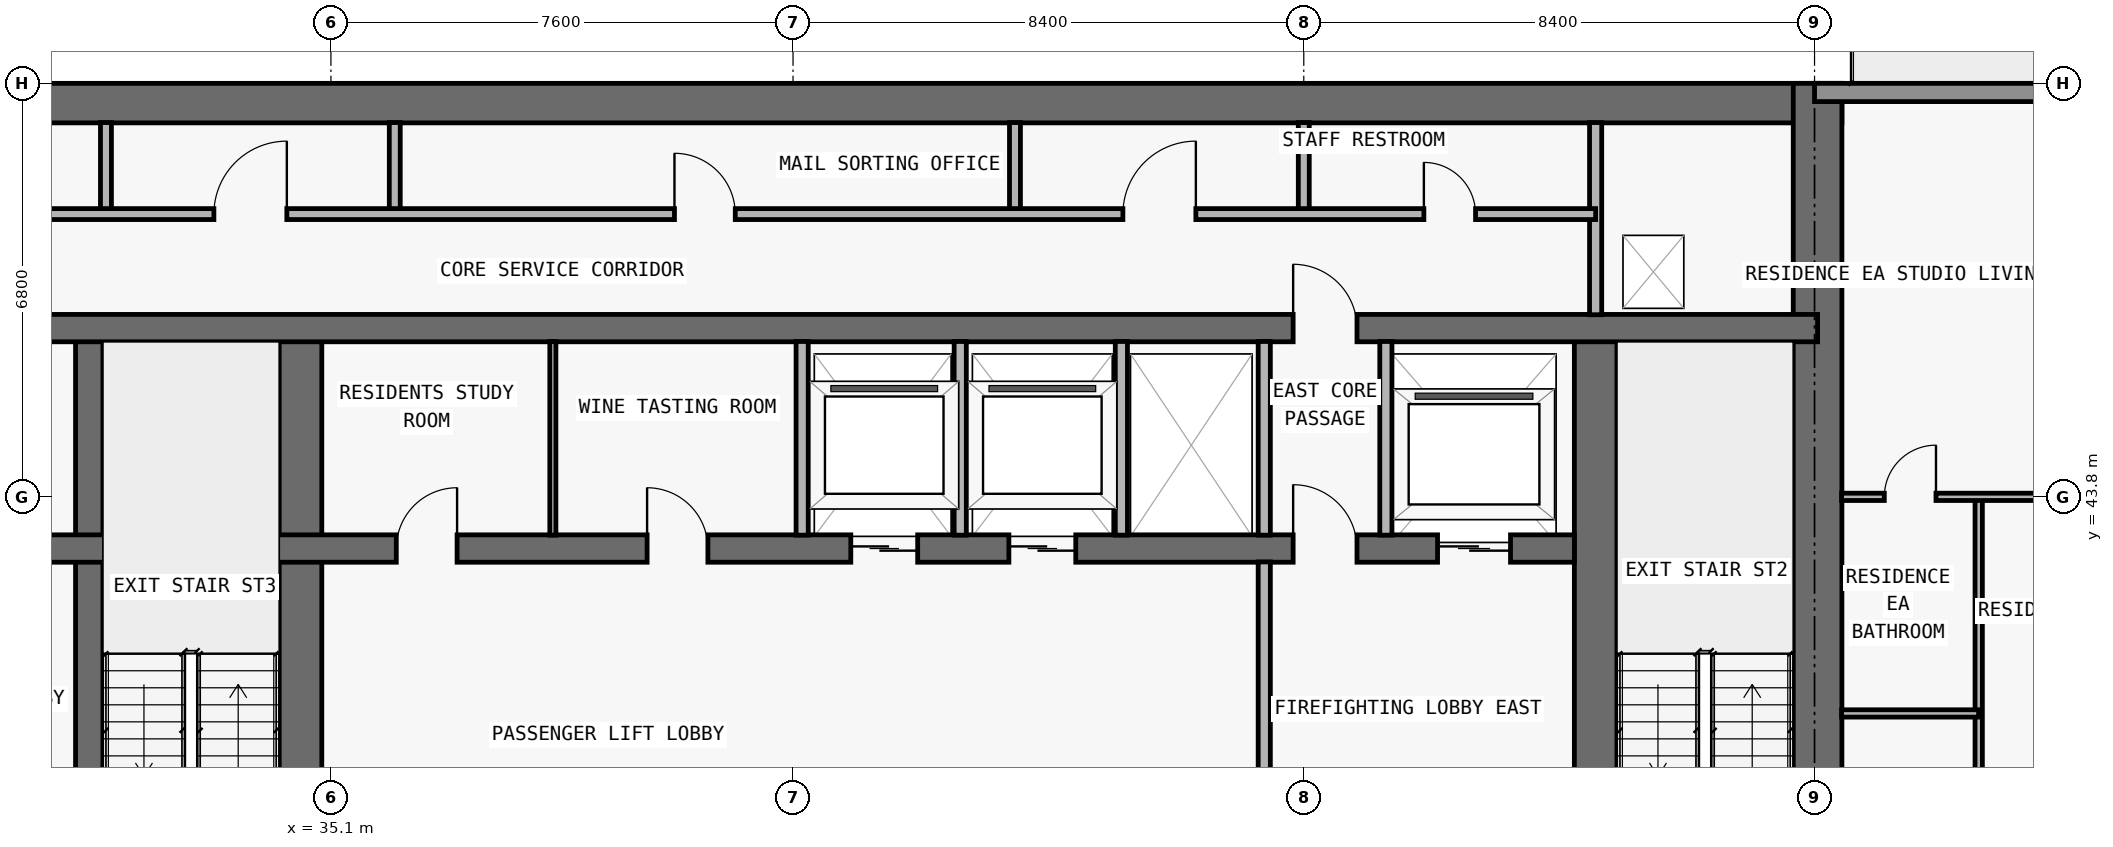
"""IFC4 building model, lengths in metres.
Left out: names, types, materials, properties, quantities, classifications, styles, units other than length and angle.
Written with IfcOpenShell. Run it as: python <this file> out.ifc"""

import sys

from ifc_helpers import new_model, si_unit, direction, frame, frame_2d, origin, place, context, subcontext, project, spatial, rectangle, extrude, element, fill, save


model = new_model("IFC4")
c1 = context("Model", 3, precision=1e-05, world=origin(), true_north=direction((0.0, 1.0)))
c2 = subcontext(c1, "Body", "Model", "MODEL_VIEW")
j1 = project(units=[si_unit("LENGTHUNIT", "METRE"), si_unit("PLANEANGLEUNIT", "RADIAN")], contexts=[c1])
p1 = place(None, origin())
s1 = spatial("IfcSite", under=j1, at=p1, CompositionType="ELEMENT")
p2 = place(p1, origin())
s2 = spatial("IfcBuilding", under=s1, at=p2, CompositionType="ELEMENT")
p3 = place(p2, frame((0.0, 0.0, 109.2)))
s3 = spatial("IfcBuildingStorey", under=s2, at=p3, CompositionType="ELEMENT", Elevation=109.2)
p4 = place(p3, frame((17.85, 50.275, 0.0), z_axis=(0.0, 0.0, 1.0), x_axis=(1.0, 0.0, 0.0)))
e1 = element("IfcWall", 1, at=p4, inside=s3, PredefinedType="SHEAR", context=c2, shape_type="SweptSolid", body=[
    extrude(rectangle(XDim=42.1, YDim=0.65, at=frame_2d((21.05, 0.0))), origin(), (0.0, 0.0, 1.0), 3.05),
])
p5 = place(p3, frame((59.55, 36.55, 0.0), z_axis=(0.0, 0.0, 1.0), x_axis=(0.0, 1.0, 0.0)))
e2 = element("IfcWall", 2, at=p5, inside=s3, PredefinedType="SHEAR", context=c2, shape_type="SweptSolid", body=[
    extrude(rectangle(XDim=14.05, YDim=0.8, at=frame_2d((7.025, 0.0))), origin(), (0.0, 0.0, 1.0), 3.05),
])
p6 = place(p3, frame((55.9, 36.95, 0.0), z_axis=(0.0, 0.0, 1.0), x_axis=(0.0, 1.0, 0.0)))
e3 = element("IfcWall", 3, at=p6, inside=s3, PredefinedType="SHEAR", context=c2, shape_type="SweptSolid", body=[
    extrude(rectangle(XDim=9.625, YDim=0.7, at=frame_2d((4.812, 0.0))), origin(), (0.0, 0.0, 1.0), 3.05),
])
p7 = place(p6, frame((0.6, 0.0, 0.0)))
e4 = element("IfcOpeningElement", 4, at=p7, cuts=e3, PredefinedType="OPENING", context=c2, shape_type="SweptSolid", body=[
    extrude(rectangle(XDim=1.1, YDim=2.15, at=frame_2d((0.55, 1.075))), frame((0.0, 0.36, 0.0), z_axis=(0.0, -1.0, 0.0), x_axis=(1.0, 0.0, 0.0)), (0.0, 0.0, 1.0), 0.72),
])
p8 = place(p3, frame((31.125, 36.95, 0.0), z_axis=(0.0, 0.0, 1.0), x_axis=(0.0, 1.0, 0.0)))
e5 = element("IfcWall", 5, at=p8, inside=s3, PredefinedType="SHEAR", context=c2, shape_type="SweptSolid", body=[
    extrude(rectangle(XDim=9.625, YDim=0.45, at=frame_2d((4.812, 0.0))), origin(), (0.0, 0.0, 1.0), 3.05),
])
p9 = place(p3, frame((34.6, 36.95, 0.0), z_axis=(0.0, 0.0, 1.0), x_axis=(0.0, 1.0, 0.0)))
e6 = element("IfcWall", 6, at=p9, inside=s3, PredefinedType="SHEAR", context=c2, shape_type="SweptSolid", body=[
    extrude(rectangle(XDim=9.625, YDim=0.7, at=frame_2d((4.812, 0.0))), origin(), (0.0, 0.0, 1.0), 3.05),
])
p10 = place(p3, frame((22.25, 42.95, 0.0), z_axis=(0.0, 0.0, 1.0), x_axis=(1.0, 0.0, 0.0)))
e7 = element("IfcWall", 7, at=p10, inside=s3, PredefinedType="SHEAR", context=c2, shape_type="SweptSolid", body=[
    extrude(rectangle(XDim=33.3, YDim=0.45, at=frame_2d((16.65, 0.0))), origin(), (0.0, 0.0, 1.0), 3.05),
])
p11 = place(p10, frame((1.05, 0.0, 0.0)))
e8 = element("IfcOpeningElement", 8, at=p11, cuts=e7, PredefinedType="OPENING", context=c2, shape_type="SweptSolid", body=[
    extrude(rectangle(XDim=1.2, YDim=2.2, at=frame_2d((0.6, 1.1))), frame((0.0, 0.235, 0.0), z_axis=(0.0, -1.0, 0.0), x_axis=(1.0, 0.0, 0.0)), (0.0, 0.0, 1.0), 0.47),
])
p12 = place(p10, frame((31.05, 0.0, 0.0)))
e9 = element("IfcOpeningElement", 9, at=p12, cuts=e7, PredefinedType="OPENING", context=c2, shape_type="SweptSolid", body=[
    extrude(rectangle(XDim=1.2, YDim=2.2, at=frame_2d((0.6, 1.1))), frame((0.0, 0.235, 0.0), z_axis=(0.0, -1.0, 0.0), x_axis=(1.0, 0.0, 0.0)), (0.0, 0.0, 1.0), 0.47),
])
p13 = place(p10, frame((21.4, 0.0, 0.0)))
e10 = element("IfcOpeningElement", 10, at=p13, cuts=e7, PredefinedType="OPENING", context=c2, shape_type="SweptSolid", body=[
    extrude(rectangle(XDim=1.1, YDim=2.2, at=frame_2d((0.55, 1.1))), frame((0.0, 0.235, 0.0), z_axis=(0.0, -1.0, 0.0), x_axis=(1.0, 0.0, 0.0)), (0.0, 0.0, 1.0), 0.47),
])
p14 = place(p10, frame((24.0, 0.0, 0.0)))
e11 = element("IfcOpeningElement", 11, at=p14, cuts=e7, PredefinedType="OPENING", context=c2, shape_type="SweptSolid", body=[
    extrude(rectangle(XDim=1.1, YDim=2.2, at=frame_2d((0.55, 1.1))), frame((0.0, 0.235, 0.0), z_axis=(0.0, -1.0, 0.0), x_axis=(1.0, 0.0, 0.0)), (0.0, 0.0, 1.0), 0.47),
])
p15 = place(p10, frame((3.625, 0.0, 0.0)))
e12 = element("IfcOpeningElement", 12, at=p15, cuts=e7, PredefinedType="OPENING", context=c2, shape_type="SweptSolid", body=[
    extrude(rectangle(XDim=1.05, YDim=2.15, at=frame_2d((0.525, 1.075))), frame((0.0, 0.235, 0.0), z_axis=(0.0, -1.0, 0.0), x_axis=(1.0, 0.0, 0.0)), (0.0, 0.0, 1.0), 0.47),
])
p16 = place(p10, frame((28.675, 0.0, 0.0)))
e13 = element("IfcOpeningElement", 13, at=p16, cuts=e7, PredefinedType="OPENING", context=c2, shape_type="SweptSolid", body=[
    extrude(rectangle(XDim=1.05, YDim=2.15, at=frame_2d((0.525, 1.075))), frame((0.0, 0.235, 0.0), z_axis=(0.0, -1.0, 0.0), x_axis=(1.0, 0.0, 0.0)), (0.0, 0.0, 1.0), 0.47),
])
p17 = place(p10, frame((13.925, 0.0, 0.0)))
e14 = element("IfcOpeningElement", 14, at=p17, cuts=e7, PredefinedType="OPENING", context=c2, shape_type="SweptSolid", body=[
    extrude(rectangle(XDim=1.0, YDim=2.2, at=frame_2d((0.5, 1.1))), frame((0.0, 0.235, 0.0), z_axis=(0.0, -1.0, 0.0), x_axis=(1.0, 0.0, 0.0)), (0.0, 0.0, 1.0), 0.47),
])
p18 = place(p10, frame((18.05, 0.0, 0.0)))
e15 = element("IfcOpeningElement", 15, at=p18, cuts=e7, PredefinedType="OPENING", context=c2, shape_type="SweptSolid", body=[
    extrude(rectangle(XDim=1.0, YDim=2.2, at=frame_2d((0.5, 1.1))), frame((0.0, 0.235, 0.0), z_axis=(0.0, -1.0, 0.0), x_axis=(1.0, 0.0, 0.0)), (0.0, 0.0, 1.0), 0.47),
])
p19 = place(p3, frame((18.25, 46.575, 0.0), z_axis=(0.0, 0.0, 1.0), x_axis=(1.0, 0.0, 0.0)))
e16 = element("IfcWall", 16, at=p19, inside=s3, PredefinedType="SHEAR", context=c2, shape_type="SweptSolid", body=[
    extrude(rectangle(XDim=41.3, YDim=0.45, at=frame_2d((20.65, 0.0))), origin(), (0.0, 0.0, 1.0), 3.05),
])
p20 = place(p19, frame((7.625, 0.0, 0.0)))
e17 = element("IfcOpeningElement", 17, at=p20, cuts=e16, PredefinedType="OPENING", context=c2, shape_type="SweptSolid", body=[
    extrude(rectangle(XDim=1.05, YDim=2.15, at=frame_2d((0.525, 1.075))), frame((0.0, 0.235, 0.0), z_axis=(0.0, -1.0, 0.0), x_axis=(1.0, 0.0, 0.0)), (0.0, 0.0, 1.0), 0.47),
])
p21 = place(p19, frame((32.675, 0.0, 0.0)))
e18 = element("IfcOpeningElement", 18, at=p21, cuts=e16, PredefinedType="OPENING", context=c2, shape_type="SweptSolid", body=[
    extrude(rectangle(XDim=1.05, YDim=2.15, at=frame_2d((0.525, 1.075))), frame((0.0, 0.235, 0.0), z_axis=(0.0, -1.0, 0.0), x_axis=(1.0, 0.0, 0.0)), (0.0, 0.0, 1.0), 0.47),
])
p22 = place(p3, frame((59.5, 50.45, 0.0), z_axis=(0.0, 0.0, 1.0), x_axis=(1.0, 0.0, 0.0)))
e19 = element("IfcWall", 19, at=p22, inside=s3, PredefinedType="STANDARD", context=c2, shape_type="SweptSolid", body=[
    extrude(rectangle(XDim=10.6, YDim=0.3, at=frame_2d((5.3, 0.0))), origin(), (0.0, 0.0, 1.0), 3.05),
])
p23 = place(p22, frame((4.3, 0.0, 0.0)))
e20 = element("IfcOpeningElement", 20, at=p23, cuts=e19, PredefinedType="OPENING", context=c2, shape_type="SweptSolid", body=[
    extrude(rectangle(XDim=2.0, YDim=2.3, at=frame_2d((1.0, 1.15))), frame((0.0, 0.16, 0.0), z_axis=(0.0, -1.0, 0.0), x_axis=(1.0, 0.0, 0.0)), (0.0, 0.0, 1.0), 0.32),
])
for number, where, z_axis, x_axis in (
    (21, (31.4, 48.45, 0.0), (0.0, 0.0, 1.0), (0.0, 1.0, 0.0)),
    (22, (36.15, 48.45, 0.0), (0.0, 0.0, 1.0), (0.0, 1.0, 0.0)),
):
    element("IfcWall", number, at=place(p3, frame(where, z_axis=z_axis, x_axis=x_axis)), inside=s3, PredefinedType="PARTITIONING", context=c2, shape_type="SweptSolid", body=[
        extrude(rectangle(XDim=1.505, YDim=0.18, at=frame_2d((0.752, 0.0))), origin(), (0.0, 0.0, 1.0), 3.05),
    ])
p24 = place(p3, frame((38.75, 43.17, 0.0), z_axis=(0.0, 0.0, 1.0), x_axis=(0.0, 1.0, 0.0)))
e23 = element("IfcWall", 23, at=p24, inside=s3, PredefinedType="MOVABLE", context=c2, shape_type="SweptSolid", body=[
    extrude(rectangle(XDim=3.185, YDim=0.1, at=frame_2d((1.593, 0.0))), origin(), (0.0, 0.0, 1.0), 3.05),
])
for number, where, z_axis, x_axis in (
    (24, (42.85, 43.17, 0.0), (0.0, 0.0, 1.0), (0.0, 1.0, 0.0)),
    (25, (45.45, 43.17, 0.0), (0.0, 0.0, 1.0), (0.0, 1.0, 0.0)),
):
    element("IfcWall", number, at=place(p3, frame(where, z_axis=z_axis, x_axis=x_axis)), inside=s3, PredefinedType="PARTITIONING", context=c2, shape_type="SweptSolid", body=[
        extrude(rectangle(XDim=3.185, YDim=0.2, at=frame_2d((1.593, 0.0))), origin(), (0.0, 0.0, 1.0), 3.05),
    ])
p25 = place(p3, frame((46.35, 48.45, 0.0), z_axis=(0.0, 0.0, 1.0), x_axis=(0.0, 1.0, 0.0)))
e26 = element("IfcWall", 26, at=p25, inside=s3, PredefinedType="PARTITIONING", context=c2, shape_type="SweptSolid", body=[
    extrude(rectangle(XDim=1.505, YDim=0.18, at=frame_2d((0.752, 0.0))), origin(), (0.0, 0.0, 1.0), 3.05),
])
p26 = place(p3, frame((48.1, 43.17, 0.0), z_axis=(0.0, 0.0, 1.0), x_axis=(0.0, 1.0, 0.0)))
e27 = element("IfcWall", 27, at=p26, inside=s3, PredefinedType="PARTITIONING", context=c2, shape_type="SweptSolid", body=[
    extrude(rectangle(XDim=3.185, YDim=0.2, at=frame_2d((1.593, 0.0))), origin(), (0.0, 0.0, 1.0), 3.05),
])
p27 = place(p3, frame((50.45, 37.345, 0.0), z_axis=(0.0, 0.0, 1.0), x_axis=(0.0, 1.0, 0.0)))
e28 = element("IfcWall", 28, at=p27, inside=s3, PredefinedType="PARTITIONING", context=c2, shape_type="SweptSolid", body=[
    extrude(rectangle(XDim=5.385, YDim=0.2, at=frame_2d((2.692, 0.0))), origin(), (0.0, 0.0, 1.0), 3.05),
])
p28 = place(p3, frame((50.45, 43.17, 0.0), z_axis=(0.0, 0.0, 1.0), x_axis=(0.0, 1.0, 0.0)))
e29 = element("IfcWall", 29, at=p28, inside=s3, PredefinedType="PARTITIONING", context=c2, shape_type="SweptSolid", body=[
    extrude(rectangle(XDim=3.185, YDim=0.2, at=frame_2d((1.593, 0.0))), origin(), (0.0, 0.0, 1.0), 3.05),
])
p29 = place(p3, frame((51.1, 48.45, 0.0), z_axis=(0.0, 0.0, 1.0), x_axis=(0.0, 1.0, 0.0)))
e30 = element("IfcWall", 30, at=p29, inside=s3, PredefinedType="PARTITIONING", context=c2, shape_type="SweptSolid", body=[
    extrude(rectangle(XDim=1.505, YDim=0.18, at=frame_2d((0.752, 0.0))), origin(), (0.0, 0.0, 1.0), 3.05),
])
p30 = place(p3, frame((52.45, 43.17, 0.0), z_axis=(0.0, 0.0, 1.0), x_axis=(0.0, 1.0, 0.0)))
e31 = element("IfcWall", 31, at=p30, inside=s3, PredefinedType="PARTITIONING", context=c2, shape_type="SweptSolid", body=[
    extrude(rectangle(XDim=3.185, YDim=0.2, at=frame_2d((1.593, 0.0))), origin(), (0.0, 0.0, 1.0), 3.05),
])
p31 = place(p3, frame((55.9, 46.795, 0.0), z_axis=(0.0, 0.0, 1.0), x_axis=(0.0, 1.0, 0.0)))
e32 = element("IfcWall", 32, at=p31, inside=s3, PredefinedType="PARTITIONING", context=c2, shape_type="SweptSolid", body=[
    extrude(rectangle(XDim=3.16, YDim=0.2, at=frame_2d((1.58, 0.0))), origin(), (0.0, 0.0, 1.0), 3.05),
])
p32 = place(p3, frame((62.2, 36.95, 0.0), z_axis=(0.0, 0.0, 1.0), x_axis=(0.0, 1.0, 0.0)))
e33 = element("IfcWall", 33, at=p32, inside=s3, PredefinedType="PARTITIONING", context=c2, shape_type="SweptSolid", body=[
    extrude(rectangle(XDim=6.85, YDim=0.12, at=frame_2d((3.425, 0.0))), origin(), (0.0, 0.0, 1.0), 3.05),
])
p33 = place(p32, frame((1.219, 0.0, 0.0)))
e34 = element("IfcOpeningElement", 34, at=p33, cuts=e33, PredefinedType="OPENING", context=c2, shape_type="SweptSolid", body=[
    extrude(rectangle(XDim=0.85, YDim=2.1, at=frame_2d((0.425, 1.05))), frame((0.0, 0.07, 0.0), z_axis=(0.0, -1.0, 0.0), x_axis=(1.0, 0.0, 0.0)), (0.0, 0.0, 1.0), 0.14),
])
p34 = place(p3, frame((59.945, 40.238, 0.0), z_axis=(0.0, 0.0, 1.0), x_axis=(1.0, 0.0, 0.0)))
e35 = element("IfcWall", 35, at=p34, inside=s3, PredefinedType="PARTITIONING", context=c2, shape_type="SweptSolid", body=[
    extrude(rectangle(XDim=2.255, YDim=0.12, at=frame_2d((1.127, 0.0))), origin(), (0.0, 0.0, 1.0), 3.05),
])
p35 = place(p3, frame((59.945, 43.8, 0.0), z_axis=(0.0, 0.0, 1.0), x_axis=(1.0, 0.0, 0.0)))
e36 = element("IfcWall", 36, at=p35, inside=s3, PredefinedType="PARTITIONING", context=c2, shape_type="SweptSolid", body=[
    extrude(rectangle(XDim=13.66, YDim=0.12, at=frame_2d((6.83, 0.0))), origin(), (0.0, 0.0, 1.0), 2.339),
])
p36 = place(p35, frame((4.017, 0.0, 0.0)))
e37 = element("IfcOpeningElement", 37, at=p36, cuts=e36, PredefinedType="OPENING", context=c2, shape_type="SweptSolid", body=[
    extrude(rectangle(XDim=0.9, YDim=2.15, at=frame_2d((0.45, 1.075))), frame((0.0, 0.07, 0.0), z_axis=(0.0, -1.0, 0.0), x_axis=(1.0, 0.0, 0.0)), (0.0, 0.0, 1.0), 0.14),
])
p37 = place(p35, frame((0.702, 0.0, 0.0)))
e38 = element("IfcOpeningElement", 38, at=p37, cuts=e36, PredefinedType="OPENING", context=c2, shape_type="SweptSolid", body=[
    extrude(rectangle(XDim=0.85, YDim=2.1, at=frame_2d((0.425, 1.05))), frame((0.0, 0.07, 0.0), z_axis=(0.0, -1.0, 0.0), x_axis=(1.0, 0.0, 0.0)), (0.0, 0.0, 1.0), 0.14),
])
p38 = place(p3, frame((26.7, 48.45, 0.0), z_axis=(0.0, 0.0, 1.0), x_axis=(1.0, 0.0, 0.0)))
e39 = element("IfcWall", 39, at=p38, inside=s3, PredefinedType="PARTITIONING", context=c2, shape_type="SweptSolid", body=[
    extrude(rectangle(XDim=29.2, YDim=0.18, at=frame_2d((14.6, 0.0))), origin(), (0.0, 0.0, 1.0), 3.05),
])
p39 = place(p38, frame((1.75, 0.0, 0.0)))
e40 = element("IfcOpeningElement", 40, at=p39, cuts=e39, PredefinedType="OPENING", context=c2, shape_type="SweptSolid", body=[
    extrude(rectangle(XDim=1.2, YDim=2.2, at=frame_2d((0.6, 1.1))), frame((0.0, 0.1, 0.0), z_axis=(0.0, -1.0, 0.0), x_axis=(1.0, 0.0, 0.0)), (0.0, 0.0, 1.0), 0.2),
])
p40 = place(p38, frame((6.475, 0.0, 0.0)))
e41 = element("IfcOpeningElement", 41, at=p40, cuts=e39, PredefinedType="OPENING", context=c2, shape_type="SweptSolid", body=[
    extrude(rectangle(XDim=1.2, YDim=2.2, at=frame_2d((0.6, 1.1))), frame((0.0, 0.1, 0.0), z_axis=(0.0, -1.0, 0.0), x_axis=(1.0, 0.0, 0.0)), (0.0, 0.0, 1.0), 0.2),
])
p41 = place(p38, frame((14.05, 0.0, 0.0)))
e42 = element("IfcOpeningElement", 42, at=p41, cuts=e39, PredefinedType="OPENING", context=c2, shape_type="SweptSolid", body=[
    extrude(rectangle(XDim=1.0, YDim=2.2, at=frame_2d((0.5, 1.1))), frame((0.0, 0.1, 0.0), z_axis=(0.0, -1.0, 0.0), x_axis=(1.0, 0.0, 0.0)), (0.0, 0.0, 1.0), 0.2),
])
p42 = place(p38, frame((21.425, 0.0, 0.0)))
e43 = element("IfcOpeningElement", 43, at=p42, cuts=e39, PredefinedType="OPENING", context=c2, shape_type="SweptSolid", body=[
    extrude(rectangle(XDim=1.2, YDim=2.2, at=frame_2d((0.6, 1.1))), frame((0.0, 0.1, 0.0), z_axis=(0.0, -1.0, 0.0), x_axis=(1.0, 0.0, 0.0)), (0.0, 0.0, 1.0), 0.2),
])
p43 = place(p38, frame((26.375, 0.0, 0.0)))
e44 = element("IfcOpeningElement", 44, at=p43, cuts=e39, PredefinedType="OPENING", context=c2, shape_type="SweptSolid", body=[
    extrude(rectangle(XDim=0.85, YDim=2.1, at=frame_2d((0.425, 1.05))), frame((0.0, 0.1, 0.0), z_axis=(0.0, -1.0, 0.0), x_axis=(1.0, 0.0, 0.0)), (0.0, 0.0, 1.0), 0.2),
])
p44 = place(p12, origin())
e45 = element("IfcDoor", 45, at=p44, inside=s3, OperationType="DOUBLE_DOOR_SLIDING", PredefinedType="DOOR", context=c2, shape_type="SweptSolid", body=[
    extrude(rectangle(XDim=1.2, YDim=2.2, at=frame_2d((0.6, 1.1))), frame((0.0, 0.025, 0.0), z_axis=(0.0, -1.0, 0.0), x_axis=(1.0, 0.0, 0.0)), (0.0, 0.0, 1.0), 0.05),
])
fill(e9, e45)
p45 = place(p13, origin())
e46 = element("IfcDoor", 46, at=p45, inside=s3, OperationType="DOUBLE_DOOR_SLIDING", PredefinedType="DOOR", context=c2, shape_type="SweptSolid", body=[
    extrude(rectangle(XDim=1.1, YDim=2.2, at=frame_2d((0.55, 1.1))), frame((0.0, 0.025, 0.0), z_axis=(0.0, -1.0, 0.0), x_axis=(1.0, 0.0, 0.0)), (0.0, 0.0, 1.0), 0.05),
])
fill(e10, e46)
p46 = place(p14, origin())
e47 = element("IfcDoor", 47, at=p46, inside=s3, OperationType="DOUBLE_DOOR_SLIDING", PredefinedType="DOOR", context=c2, shape_type="SweptSolid", body=[
    extrude(rectangle(XDim=1.1, YDim=2.2, at=frame_2d((0.55, 1.1))), frame((0.0, 0.025, 0.0), z_axis=(0.0, -1.0, 0.0), x_axis=(1.0, 0.0, 0.0)), (0.0, 0.0, 1.0), 0.05),
])
fill(e11, e47)
p47 = place(p16, origin())
e48 = element("IfcDoor", 48, at=p47, inside=s3, OperationType="SINGLE_SWING_LEFT", PredefinedType="DOOR", context=c2, shape_type="SweptSolid", body=[
    extrude(rectangle(XDim=1.05, YDim=2.15, at=frame_2d((0.525, 1.075))), frame((0.0, 0.025, 0.0), z_axis=(0.0, -1.0, 0.0), x_axis=(1.0, 0.0, 0.0)), (0.0, 0.0, 1.0), 0.05),
])
fill(e13, e48)
p48 = place(p17, origin())
e49 = element("IfcDoor", 49, at=p48, inside=s3, OperationType="SINGLE_SWING_RIGHT", PredefinedType="DOOR", context=c2, shape_type="SweptSolid", body=[
    extrude(rectangle(XDim=1.0, YDim=2.2, at=frame_2d((0.5, 1.1))), frame((0.0, 0.025, 0.0), z_axis=(0.0, -1.0, 0.0), x_axis=(1.0, 0.0, 0.0)), (0.0, 0.0, 1.0), 0.05),
])
fill(e14, e49)
p49 = place(p18, origin())
e50 = element("IfcDoor", 50, at=p49, inside=s3, OperationType="SINGLE_SWING_LEFT", PredefinedType="DOOR", context=c2, shape_type="SweptSolid", body=[
    extrude(rectangle(XDim=1.0, YDim=2.2, at=frame_2d((0.5, 1.1))), frame((0.0, 0.025, 0.0), z_axis=(0.0, -1.0, 0.0), x_axis=(1.0, 0.0, 0.0)), (0.0, 0.0, 1.0), 0.05),
])
fill(e15, e50)
p50 = place(p21, origin())
e51 = element("IfcDoor", 51, at=p50, inside=s3, OperationType="SINGLE_SWING_LEFT", PredefinedType="DOOR", context=c2, shape_type="SweptSolid", body=[
    extrude(rectangle(XDim=1.05, YDim=2.15, at=frame_2d((0.525, 1.075))), frame((0.0, 0.025, 0.0), z_axis=(0.0, -1.0, 0.0), x_axis=(1.0, 0.0, 0.0)), (0.0, 0.0, 1.0), 0.05),
])
fill(e18, e51)
p51 = place(p40, origin())
e52 = element("IfcDoor", 52, at=p51, inside=s3, OperationType="SINGLE_SWING_RIGHT", PredefinedType="DOOR", context=c2, shape_type="SweptSolid", body=[
    extrude(rectangle(XDim=1.2, YDim=2.2, at=frame_2d((0.6, 1.1))), frame((0.0, 0.025, 0.0), z_axis=(0.0, -1.0, 0.0), x_axis=(1.0, 0.0, 0.0)), (0.0, 0.0, 1.0), 0.05),
])
fill(e41, e52)
p52 = place(p41, origin())
e53 = element("IfcDoor", 53, at=p52, inside=s3, OperationType="SINGLE_SWING_LEFT", PredefinedType="DOOR", context=c2, shape_type="SweptSolid", body=[
    extrude(rectangle(XDim=1.0, YDim=2.2, at=frame_2d((0.5, 1.1))), frame((0.0, 0.025, 0.0), z_axis=(0.0, -1.0, 0.0), x_axis=(1.0, 0.0, 0.0)), (0.0, 0.0, 1.0), 0.05),
])
fill(e42, e53)
p53 = place(p42, origin())
e54 = element("IfcDoor", 54, at=p53, inside=s3, OperationType="SINGLE_SWING_RIGHT", PredefinedType="DOOR", context=c2, shape_type="SweptSolid", body=[
    extrude(rectangle(XDim=1.2, YDim=2.2, at=frame_2d((0.6, 1.1))), frame((0.0, 0.025, 0.0), z_axis=(0.0, -1.0, 0.0), x_axis=(1.0, 0.0, 0.0)), (0.0, 0.0, 1.0), 0.05),
])
fill(e43, e54)
p54 = place(p43, origin())
e55 = element("IfcDoor", 55, at=p54, inside=s3, OperationType="SINGLE_SWING_LEFT", PredefinedType="DOOR", context=c2, shape_type="SweptSolid", body=[
    extrude(rectangle(XDim=0.85, YDim=2.1, at=frame_2d((0.425, 1.05))), frame((0.0, 0.025, 0.0), z_axis=(0.0, -1.0, 0.0), x_axis=(1.0, 0.0, 0.0)), (0.0, 0.0, 1.0), 0.05),
])
fill(e44, e55)
p55 = place(p37, origin())
e56 = element("IfcDoor", 56, at=p55, inside=s3, OperationType="SINGLE_SWING_RIGHT", PredefinedType="DOOR", context=c2, shape_type="SweptSolid", body=[
    extrude(rectangle(XDim=0.85, YDim=2.1, at=frame_2d((0.425, 1.05))), frame((0.0, 0.025, 0.0), z_axis=(0.0, -1.0, 0.0), x_axis=(1.0, 0.0, 0.0)), (0.0, 0.0, 1.0), 0.05),
])
fill(e38, e56)
save(model, sys.argv[1])
